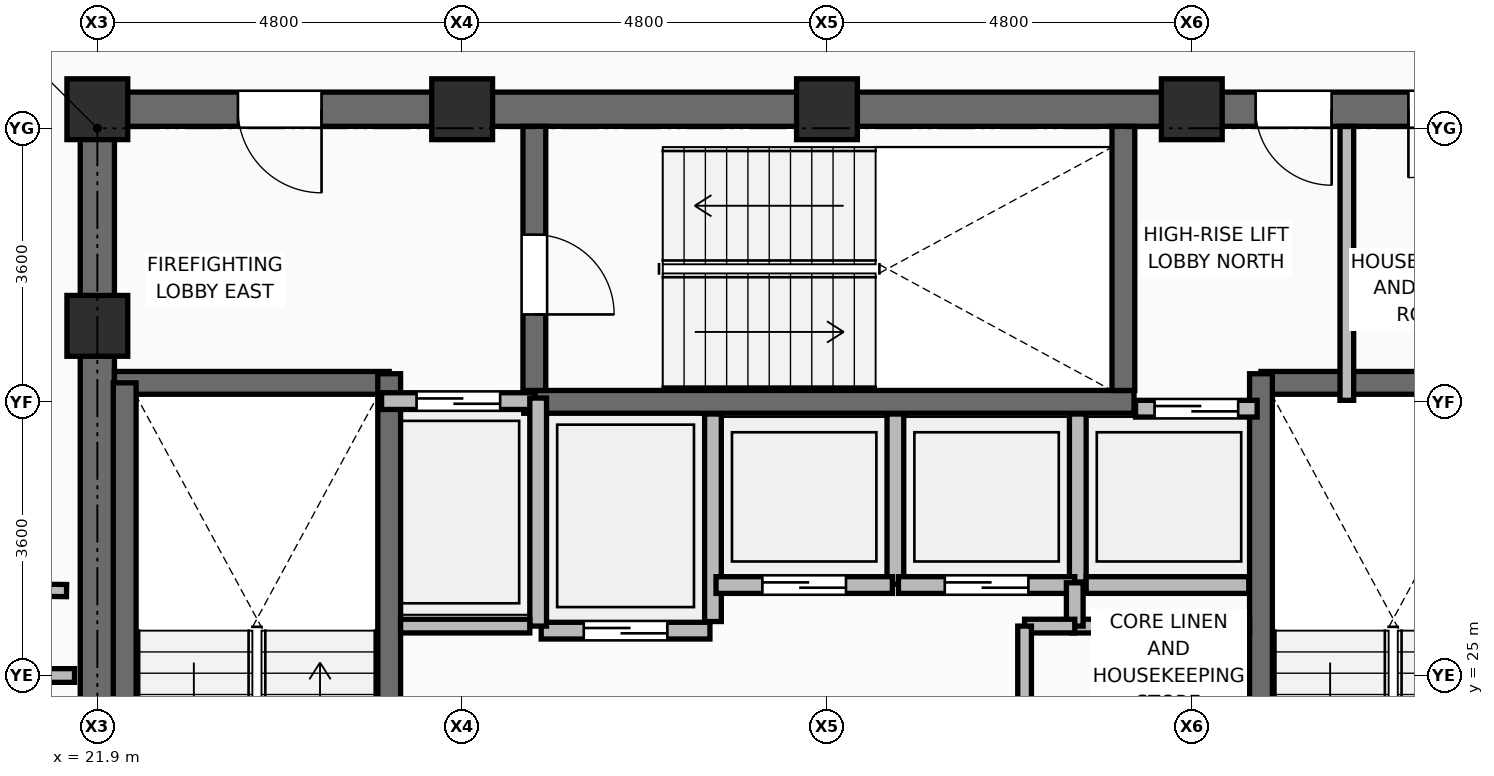
"""IFC4 building model, lengths in metres.
Left out: names, types, materials, properties, quantities, classifications, styles, units other than length and angle.
Written with IfcOpenShell. Run it as: python <this file> out.ifc"""

import sys

from ifc_helpers import new_model, si_unit, direction, frame, frame_2d, origin, origin_2d, place, context, subcontext, project, spatial, rectangle, extrude, element, fill, save


model = new_model("IFC4")
c1 = context("Model", 3, precision=1e-05, world=origin(), true_north=direction((0.0, 1.0)))
c2 = subcontext(c1, "Body", "Model", "MODEL_VIEW")
j1 = project(units=[si_unit("LENGTHUNIT", "METRE"), si_unit("PLANEANGLEUNIT", "RADIAN")], contexts=[c1])
p1 = place(None, origin())
s1 = spatial("IfcSite", under=j1, at=p1, CompositionType="ELEMENT")
p2 = place(p1, origin())
s2 = spatial("IfcBuilding", under=s1, at=p2, CompositionType="ELEMENT")
p3 = place(p2, frame((0.0, 0.0, 249.9)))
s3 = spatial("IfcBuildingStorey", under=s2, at=p3, CompositionType="ELEMENT", Elevation=249.9)
for number, where, z_axis, x_axis in (
    (1, (21.9, 29.6, 0.0), (0.0, 0.0, 1.0), (1.0, 0.0, 0.0)),
    (2, (21.9, 32.45, 0.0), (0.0, 0.0, 1.0), (1.0, 0.0, 0.0)),
    (3, (26.7, 32.45, 0.0), (0.0, 0.0, 1.0), (1.0, 0.0, 0.0)),
    (4, (31.5, 32.45, 0.0), (0.0, 0.0, 1.0), (1.0, 0.0, 0.0)),
    (5, (36.3, 32.45, 0.0), (0.0, 0.0, 1.0), (1.0, 0.0, 0.0)),
):
    element("IfcColumn", number, at=place(p3, frame(where, z_axis=z_axis, x_axis=x_axis)), inside=s3, PredefinedType="COLUMN", context=c2, shape_type="SweptSolid", body=[
        extrude(rectangle(XDim=0.8, YDim=0.8, at=origin_2d()), origin(), (0.0, 0.0, 1.0), 3.75),
    ])
p4 = place(p3, frame((30.0, 25.71, 0.0), z_axis=(0.0, 0.0, 1.0), x_axis=(0.0, 1.0, 0.0)))
e6 = element("IfcWall", 6, at=p4, inside=s3, PredefinedType="PARTITIONING", context=c2, shape_type="SweptSolid", body=[
    extrude(rectangle(XDim=2.73, YDim=0.22, at=frame_2d((1.365, 0.0))), origin(), (0.0, 0.0, 1.0), 3.475),
])
p5 = place(p3, frame((32.4, 26.2, 0.0), z_axis=(0.0, 0.0, 1.0), x_axis=(0.0, 1.0, 0.0)))
e7 = element("IfcWall", 7, at=p5, inside=s3, PredefinedType="PARTITIONING", context=c2, shape_type="SweptSolid", body=[
    extrude(rectangle(XDim=2.24, YDim=0.22, at=frame_2d((1.12, 0.0))), origin(), (0.0, 0.0, 1.0), 3.475),
])
p6 = place(p3, frame((34.8, 26.23, 0.0), z_axis=(0.0, 0.0, 1.0), x_axis=(0.0, 1.0, 0.0)))
e8 = element("IfcWall", 8, at=p6, inside=s3, PredefinedType="PARTITIONING", context=c2, shape_type="SweptSolid", body=[
    extrude(rectangle(XDim=2.21, YDim=0.22, at=frame_2d((1.105, 0.0))), origin(), (0.0, 0.0, 1.0), 3.475),
])
p7 = place(p3, frame((34.91, 26.19, 0.0), z_axis=(0.0, 0.0, 1.0), x_axis=(1.0, 0.0, 0.0)))
e9 = element("IfcWall", 9, at=p7, inside=s3, PredefinedType="PARTITIONING", context=c2, shape_type="SweptSolid", body=[
    extrude(rectangle(XDim=2.14, YDim=0.22, at=frame_2d((1.07, 0.0))), origin(), (0.0, 0.0, 1.0), 3.475),
])
p8 = place(p3, frame((21.675, 32.45, 0.0), z_axis=(0.0, 0.0, 1.0), x_axis=(1.0, 0.0, 0.0)))
e10 = element("IfcWall", 10, at=p8, inside=s3, PredefinedType="SHEAR", context=c2, shape_type="SweptSolid", body=[
    extrude(rectangle(XDim=19.65, YDim=0.45, at=frame_2d((9.825, 0.0))), origin(), (0.0, 0.0, 1.0), 3.5),
])
p9 = place(p8, frame((2.075, 0.0, 0.0)))
e11 = element("IfcOpeningElement", 11, at=p9, cuts=e10, PredefinedType="OPENING", context=c2, shape_type="SweptSolid", body=[
    extrude(rectangle(XDim=1.1, YDim=2.1, at=frame_2d((0.55, 1.05))), frame((0.0, 0.235, 0.0), z_axis=(0.0, -1.0, 0.0), x_axis=(1.0, 0.0, 0.0)), (0.0, 0.0, 1.0), 0.47),
])
p10 = place(p8, frame((15.465, 0.0, 0.0)))
e12 = element("IfcOpeningElement", 12, at=p10, cuts=e10, PredefinedType="OPENING", context=c2, shape_type="SweptSolid", body=[
    extrude(rectangle(XDim=1.0, YDim=2.1, at=frame_2d((0.5, 1.05))), frame((0.0, 0.235, 0.0), z_axis=(0.0, -1.0, 0.0), x_axis=(1.0, 0.0, 0.0)), (0.0, 0.0, 1.0), 0.47),
])
p11 = place(p8, frame((17.475, 0.0, 0.0)))
e13 = element("IfcOpeningElement", 13, at=p11, cuts=e10, PredefinedType="OPENING", context=c2, shape_type="SweptSolid", body=[
    extrude(rectangle(XDim=0.9, YDim=2.1, at=frame_2d((0.45, 1.05))), frame((0.0, 0.235, 0.0), z_axis=(0.0, -1.0, 0.0), x_axis=(1.0, 0.0, 0.0)), (0.0, 0.0, 1.0), 0.47),
])
p12 = place(p3, frame((21.9, 18.025, 0.0), z_axis=(0.0, 0.0, 1.0), x_axis=(0.0, 1.0, 0.0)))
e14 = element("IfcWall", 14, at=p12, inside=s3, PredefinedType="SHEAR", context=c2, shape_type="SweptSolid", body=[
    extrude(rectangle(XDim=14.2, YDim=0.45, at=frame_2d((7.1, 0.0))), origin(), (0.0, 0.0, 1.0), 3.5),
])
p13 = place(p3, frame((22.125, 28.85, 0.0), z_axis=(0.0, 0.0, 1.0), x_axis=(1.0, 0.0, 0.0)))
e15 = element("IfcWall", 15, at=p13, inside=s3, PredefinedType="SHEAR", context=c2, shape_type="SweptSolid", body=[
    extrude(rectangle(XDim=3.615, YDim=0.3, at=frame_2d((1.808, 0.0))), origin(), (0.0, 0.0, 1.0), 3.5),
])
p14 = place(p3, frame((25.74, 20.98, 0.0), z_axis=(0.0, 0.0, 1.0), x_axis=(0.0, 1.0, 0.0)))
e16 = element("IfcWall", 16, at=p14, inside=s3, PredefinedType="SHEAR", context=c2, shape_type="SweptSolid", body=[
    extrude(rectangle(XDim=7.99, YDim=0.3, at=frame_2d((3.995, 0.0))), origin(), (0.0, 0.0, 1.0), 3.5),
])
p15 = place(p3, frame((22.26, 21.1, 0.0), z_axis=(0.0, 0.0, 1.0), x_axis=(0.0, 1.0, 0.0)))
e17 = element("IfcWall", 17, at=p15, inside=s3, PredefinedType="SHEAR", context=c2, shape_type="SweptSolid", body=[
    extrude(rectangle(XDim=7.75, YDim=0.3, at=frame_2d((3.875, 0.0))), origin(), (0.0, 0.0, 1.0), 3.5),
])
p16 = place(p3, frame((37.21, 28.85, 0.0), z_axis=(0.0, 0.0, 1.0), x_axis=(1.0, 0.0, 0.0)))
e18 = element("IfcWall", 18, at=p16, inside=s3, PredefinedType="SHEAR", context=c2, shape_type="SweptSolid", body=[
    extrude(rectangle(XDim=3.665, YDim=0.3, at=frame_2d((1.833, 0.0))), origin(), (0.0, 0.0, 1.0), 3.5),
])
p17 = place(p3, frame((37.21, 20.98, 0.0), z_axis=(0.0, 0.0, 1.0), x_axis=(0.0, 1.0, 0.0)))
e19 = element("IfcWall", 19, at=p17, inside=s3, PredefinedType="SHEAR", context=c2, shape_type="SweptSolid", body=[
    extrude(rectangle(XDim=7.99, YDim=0.3, at=frame_2d((3.995, 0.0))), origin(), (0.0, 0.0, 1.0), 3.5),
])
p18 = place(p3, frame((27.51, 28.6, 0.0), z_axis=(0.0, 0.0, 1.0), x_axis=(1.0, 0.0, 0.0)))
e20 = element("IfcWall", 20, at=p18, inside=s3, PredefinedType="SHEAR", context=c2, shape_type="SweptSolid", body=[
    extrude(rectangle(XDim=8.03, YDim=0.3, at=frame_2d((4.015, 0.0))), origin(), (0.0, 0.0, 1.0), 3.5),
])
p19 = place(p3, frame((27.65, 28.75, 0.0), z_axis=(0.0, 0.0, 1.0), x_axis=(0.0, 1.0, 0.0)))
e21 = element("IfcWall", 21, at=p19, inside=s3, PredefinedType="SHEAR", context=c2, shape_type="SweptSolid", body=[
    extrude(rectangle(XDim=3.475, YDim=0.3, at=frame_2d((1.738, 0.0))), origin(), (0.0, 0.0, 1.0), 3.5),
])
p20 = place(p19, frame((1.0, 0.0, 0.0)))
e22 = element("IfcOpeningElement", 22, at=p20, cuts=e21, PredefinedType="OPENING", context=c2, shape_type="SweptSolid", body=[
    extrude(rectangle(XDim=1.05, YDim=2.1, at=frame_2d((0.525, 1.05))), frame((0.0, 0.16, 0.0), z_axis=(0.0, -1.0, 0.0), x_axis=(1.0, 0.0, 0.0)), (0.0, 0.0, 1.0), 0.32),
])
p21 = place(p3, frame((35.4, 28.75, 0.0), z_axis=(0.0, 0.0, 1.0), x_axis=(0.0, 1.0, 0.0)))
e23 = element("IfcWall", 23, at=p21, inside=s3, PredefinedType="SHEAR", context=c2, shape_type="SweptSolid", body=[
    extrude(rectangle(XDim=3.475, YDim=0.3, at=frame_2d((1.738, 0.0))), origin(), (0.0, 0.0, 1.0), 3.5),
])
p22 = place(p3, frame((25.64, 28.61, 0.0), z_axis=(0.0, 0.0, 1.0), x_axis=(1.0, 0.0, 0.0)))
e24 = element("IfcWall", 24, at=p22, inside=s3, PredefinedType="PARTITIONING", context=c2, shape_type="SweptSolid", body=[
    extrude(rectangle(XDim=2.02, YDim=0.22, at=frame_2d((1.01, 0.0))), origin(), (0.0, 0.0, 1.0), 3.48),
])
p23 = place(p22, frame((0.46, 0.0, 0.0)))
e25 = element("IfcOpeningElement", 25, at=p23, cuts=e24, PredefinedType="OPENING", context=c2, shape_type="SweptSolid", body=[
    extrude(rectangle(XDim=1.1, YDim=2.2, at=frame_2d((0.55, 1.1))), frame((0.0, 0.12, 0.0), z_axis=(0.0, -1.0, 0.0), x_axis=(1.0, 0.0, 0.0)), (0.0, 0.0, 1.0), 0.24),
])
p24 = place(p3, frame((27.74, 25.59, 0.0), z_axis=(0.0, 0.0, 1.0), x_axis=(1.0, 0.0, 0.0)))
e26 = element("IfcWall", 26, at=p24, inside=s3, PredefinedType="PARTITIONING", context=c2, shape_type="SweptSolid", body=[
    extrude(rectangle(XDim=2.22, YDim=0.22, at=frame_2d((1.11, 0.0))), origin(), (0.0, 0.0, 1.0), 3.48),
])
p25 = place(p24, frame((0.56, 0.0, 0.0)))
e27 = element("IfcOpeningElement", 27, at=p25, cuts=e26, PredefinedType="OPENING", context=c2, shape_type="SweptSolid", body=[
    extrude(rectangle(XDim=1.1, YDim=2.2, at=frame_2d((0.55, 1.1))), frame((0.0, 0.12, 0.0), z_axis=(0.0, -1.0, 0.0), x_axis=(1.0, 0.0, 0.0)), (0.0, 0.0, 1.0), 0.24),
])
p26 = place(p3, frame((30.04, 26.19, 0.0), z_axis=(0.0, 0.0, 1.0), x_axis=(1.0, 0.0, 0.0)))
e28 = element("IfcWall", 28, at=p26, inside=s3, PredefinedType="PARTITIONING", context=c2, shape_type="SweptSolid", body=[
    extrude(rectangle(XDim=2.32, YDim=0.22, at=frame_2d((1.16, 0.0))), origin(), (0.0, 0.0, 1.0), 3.48),
])
p27 = place(p26, frame((0.61, 0.0, 0.0)))
e29 = element("IfcOpeningElement", 29, at=p27, cuts=e28, PredefinedType="OPENING", context=c2, shape_type="SweptSolid", body=[
    extrude(rectangle(XDim=1.1, YDim=2.2, at=frame_2d((0.55, 1.1))), frame((0.0, 0.12, 0.0), z_axis=(0.0, -1.0, 0.0), x_axis=(1.0, 0.0, 0.0)), (0.0, 0.0, 1.0), 0.24),
])
p28 = place(p3, frame((32.44, 26.19, 0.0), z_axis=(0.0, 0.0, 1.0), x_axis=(1.0, 0.0, 0.0)))
e30 = element("IfcWall", 30, at=p28, inside=s3, PredefinedType="PARTITIONING", context=c2, shape_type="SweptSolid", body=[
    extrude(rectangle(XDim=2.32, YDim=0.22, at=frame_2d((1.16, 0.0))), origin(), (0.0, 0.0, 1.0), 3.48),
])
p29 = place(p28, frame((0.61, 0.0, 0.0)))
e31 = element("IfcOpeningElement", 31, at=p29, cuts=e30, PredefinedType="OPENING", context=c2, shape_type="SweptSolid", body=[
    extrude(rectangle(XDim=1.1, YDim=2.2, at=frame_2d((0.55, 1.1))), frame((0.0, 0.12, 0.0), z_axis=(0.0, -1.0, 0.0), x_axis=(1.0, 0.0, 0.0)), (0.0, 0.0, 1.0), 0.24),
])
p30 = place(p3, frame((35.56, 28.51, 0.0), z_axis=(0.0, 0.0, 1.0), x_axis=(1.0, 0.0, 0.0)))
e32 = element("IfcWall", 32, at=p30, inside=s3, PredefinedType="PARTITIONING", context=c2, shape_type="SweptSolid", body=[
    extrude(rectangle(XDim=1.6, YDim=0.22, at=frame_2d((0.8, 0.0))), origin(), (0.0, 0.0, 1.0), 3.48),
])
p31 = place(p30, frame((0.25, 0.0, 0.0)))
e33 = element("IfcOpeningElement", 33, at=p31, cuts=e32, PredefinedType="OPENING", context=c2, shape_type="SweptSolid", body=[
    extrude(rectangle(XDim=1.1, YDim=2.2, at=frame_2d((0.55, 1.1))), frame((0.0, 0.12, 0.0), z_axis=(0.0, -1.0, 0.0), x_axis=(1.0, 0.0, 0.0)), (0.0, 0.0, 1.0), 0.24),
])
p32 = place(p3, frame((27.7, 25.65, 0.0), z_axis=(0.0, 0.0, 1.0), x_axis=(0.0, 1.0, 0.0)))
e34 = element("IfcWall", 34, at=p32, inside=s3, PredefinedType="PARTITIONING", context=c2, shape_type="SweptSolid", body=[
    extrude(rectangle(XDim=3.0, YDim=0.22, at=frame_2d((1.5, 0.0))), origin(), (0.0, 0.0, 1.0), 3.48),
])
p33 = place(p3, frame((25.89, 25.65, 0.0), z_axis=(0.0, 0.0, 1.0), x_axis=(1.0, 0.0, 0.0)))
e35 = element("IfcWall", 35, at=p33, inside=s3, PredefinedType="PARTITIONING", context=c2, shape_type="SweptSolid", body=[
    extrude(rectangle(XDim=1.7, YDim=0.18, at=frame_2d((0.85, 0.0))), origin(), (0.0, 0.0, 1.0), 3.48),
])
p34 = place(p3, frame((34.72, 25.65, 0.0), z_axis=(0.0, 0.0, 1.0), x_axis=(1.0, 0.0, 0.0)))
e36 = element("IfcWall", 36, at=p34, inside=s3, PredefinedType="PARTITIONING", context=c2, shape_type="SweptSolid", body=[
    extrude(rectangle(XDim=2.34, YDim=0.18, at=frame_2d((1.17, 0.0))), origin(), (0.0, 0.0, 1.0), 3.48),
])
p35 = place(p3, frame((34.76, 25.65, 0.0), z_axis=(0.0, 0.0, 1.0), x_axis=(0.0, 1.0, 0.0)))
e37 = element("IfcWall", 37, at=p35, inside=s3, PredefinedType="PARTITIONING", context=c2, shape_type="SweptSolid", body=[
    extrude(rectangle(XDim=0.57, YDim=0.22, at=frame_2d((0.285, 0.0))), origin(), (0.0, 0.0, 1.0), 3.48),
])
p36 = place(p3, frame((34.1, 25.65, 0.0), z_axis=(0.0, 0.0, 1.0), x_axis=(1.0, 0.0, 0.0)))
e38 = element("IfcWall", 38, at=p36, inside=s3, PredefinedType="PARTITIONING", context=c2, shape_type="SweptSolid", body=[
    extrude(rectangle(XDim=0.66, YDim=0.18, at=frame_2d((0.33, 0.0))), origin(), (0.0, 0.0, 1.0), 3.48),
])
p37 = place(p3, frame((34.1, 21.1, 0.0), z_axis=(0.0, 0.0, 1.0), x_axis=(0.0, 1.0, 0.0)))
e39 = element("IfcWall", 39, at=p37, inside=s3, PredefinedType="PARTITIONING", context=c2, shape_type="SweptSolid", body=[
    extrude(rectangle(XDim=4.55, YDim=0.18, at=frame_2d((2.275, 0.0))), origin(), (0.0, 0.0, 1.0), 3.48),
])
p38 = place(p37, frame((1.825, 0.0, 0.0)))
e40 = element("IfcOpeningElement", 40, at=p38, cuts=e39, PredefinedType="OPENING", context=c2, shape_type="SweptSolid", body=[
    extrude(rectangle(XDim=0.9, YDim=2.1, at=frame_2d((0.45, 1.05))), frame((0.0, 0.1, 0.0), z_axis=(0.0, -1.0, 0.0), x_axis=(1.0, 0.0, 0.0)), (0.0, 0.0, 1.0), 0.2),
])
p39 = place(p3, frame((38.34, 28.62, 0.0), z_axis=(0.0, 0.0, 1.0), x_axis=(0.0, 1.0, 0.0)))
e41 = element("IfcWall", 41, at=p39, inside=s3, PredefinedType="PARTITIONING", context=c2, shape_type="SweptSolid", body=[
    extrude(rectangle(XDim=3.605, YDim=0.18, at=frame_2d((1.802, 0.0))), origin(), (0.0, 0.0, 1.0), 3.48),
])
p40 = place(p3, frame((21.495, 26.117, 0.0), z_axis=(0.0, 0.0, 1.0), x_axis=(-0.999908537082, 0.013524698532, 0.0)))
e42 = element("IfcWall", 42, at=p40, inside=s3, PredefinedType="PARTITIONING", context=c2, shape_type="SweptSolid", body=[
    extrude(rectangle(XDim=1.859, YDim=0.16, at=frame_2d((0.93, 0.0))), origin(), (0.0, 0.0, 1.0), 2.525),
])
p41 = place(p3, frame((21.6, 25.0, 0.0), z_axis=(0.0, 0.0, 1.0), x_axis=(-1.0, 0.0, 0.0)))
e43 = element("IfcWall", 43, at=p41, inside=s3, PredefinedType="PARTITIONING", context=c2, shape_type="SweptSolid", body=[
    extrude(rectangle(XDim=12.267, YDim=0.18, at=frame_2d((6.134, 0.0))), origin(), (0.0, 0.0, 1.0), 2.525),
])
p42 = place(p20, frame((1.05, 0.0, 0.0), z_axis=(0.0, 0.0, 1.0), x_axis=(-1.0, 0.0, 0.0)))
e44 = element("IfcDoor", 44, at=p42, inside=s3, OperationType="SINGLE_SWING_RIGHT", PredefinedType="DOOR", context=c2, shape_type="SweptSolid", body=[
    extrude(rectangle(XDim=1.05, YDim=2.1, at=frame_2d((0.525, 1.05))), frame((0.0, 0.025, 0.0), z_axis=(0.0, -1.0, 0.0), x_axis=(1.0, 0.0, 0.0)), (0.0, 0.0, 1.0), 0.05),
])
fill(e22, e44)
p43 = place(p23, origin())
e45 = element("IfcDoor", 45, at=p43, inside=s3, OperationType="DOUBLE_DOOR_SLIDING", PredefinedType="DOOR", context=c2, shape_type="SweptSolid", body=[
    extrude(rectangle(XDim=1.1, YDim=2.2, at=frame_2d((0.55, 1.1))), frame((0.0, 0.025, 0.0), z_axis=(0.0, -1.0, 0.0), x_axis=(1.0, 0.0, 0.0)), (0.0, 0.0, 1.0), 0.05),
])
fill(e25, e45)
p44 = place(p25, frame((1.1, 0.0, 0.0), z_axis=(0.0, 0.0, 1.0), x_axis=(-1.0, 0.0, 0.0)))
e46 = element("IfcDoor", 46, at=p44, inside=s3, OperationType="DOUBLE_DOOR_SLIDING", PredefinedType="DOOR", context=c2, shape_type="SweptSolid", body=[
    extrude(rectangle(XDim=1.1, YDim=2.2, at=frame_2d((0.55, 1.1))), frame((0.0, 0.025, 0.0), z_axis=(0.0, -1.0, 0.0), x_axis=(1.0, 0.0, 0.0)), (0.0, 0.0, 1.0), 0.05),
])
fill(e27, e46)
p45 = place(p27, frame((1.1, 0.0, 0.0), z_axis=(0.0, 0.0, 1.0), x_axis=(-1.0, 0.0, 0.0)))
e47 = element("IfcDoor", 47, at=p45, inside=s3, OperationType="DOUBLE_DOOR_SLIDING", PredefinedType="DOOR", context=c2, shape_type="SweptSolid", body=[
    extrude(rectangle(XDim=1.1, YDim=2.2, at=frame_2d((0.55, 1.1))), frame((0.0, 0.025, 0.0), z_axis=(0.0, -1.0, 0.0), x_axis=(1.0, 0.0, 0.0)), (0.0, 0.0, 1.0), 0.05),
])
fill(e29, e47)
p46 = place(p29, frame((1.1, 0.0, 0.0), z_axis=(0.0, 0.0, 1.0), x_axis=(-1.0, 0.0, 0.0)))
e48 = element("IfcDoor", 48, at=p46, inside=s3, OperationType="DOUBLE_DOOR_SLIDING", PredefinedType="DOOR", context=c2, shape_type="SweptSolid", body=[
    extrude(rectangle(XDim=1.1, YDim=2.2, at=frame_2d((0.55, 1.1))), frame((0.0, 0.025, 0.0), z_axis=(0.0, -1.0, 0.0), x_axis=(1.0, 0.0, 0.0)), (0.0, 0.0, 1.0), 0.05),
])
fill(e31, e48)
p47 = place(p31, origin())
e49 = element("IfcDoor", 49, at=p47, inside=s3, OperationType="DOUBLE_DOOR_SLIDING", PredefinedType="DOOR", context=c2, shape_type="SweptSolid", body=[
    extrude(rectangle(XDim=1.1, YDim=2.2, at=frame_2d((0.55, 1.1))), frame((0.0, 0.025, 0.0), z_axis=(0.0, -1.0, 0.0), x_axis=(1.0, 0.0, 0.0)), (0.0, 0.0, 1.0), 0.05),
])
fill(e33, e49)
p48 = place(p9, frame((1.1, 0.0, 0.0), z_axis=(0.0, 0.0, 1.0), x_axis=(-1.0, 0.0, 0.0)))
e50 = element("IfcDoor", 50, at=p48, inside=s3, OperationType="SINGLE_SWING_LEFT", PredefinedType="DOOR", context=c2, shape_type="SweptSolid", body=[
    extrude(rectangle(XDim=1.1, YDim=2.1, at=frame_2d((0.55, 1.05))), frame((0.0, 0.025, 0.0), z_axis=(0.0, -1.0, 0.0), x_axis=(1.0, 0.0, 0.0)), (0.0, 0.0, 1.0), 0.05),
])
fill(e11, e50)
p49 = place(p10, frame((1.0, 0.0, 0.0), z_axis=(0.0, 0.0, 1.0), x_axis=(-1.0, 0.0, 0.0)))
e51 = element("IfcDoor", 51, at=p49, inside=s3, OperationType="SINGLE_SWING_LEFT", PredefinedType="DOOR", context=c2, shape_type="SweptSolid", body=[
    extrude(rectangle(XDim=1.0, YDim=2.1, at=frame_2d((0.5, 1.05))), frame((0.0, 0.025, 0.0), z_axis=(0.0, -1.0, 0.0), x_axis=(1.0, 0.0, 0.0)), (0.0, 0.0, 1.0), 0.05),
])
fill(e12, e51)
p50 = place(p11, frame((0.9, 0.0, 0.0), z_axis=(0.0, 0.0, 1.0), x_axis=(-1.0, 0.0, 0.0)))
e52 = element("IfcDoor", 52, at=p50, inside=s3, OperationType="SINGLE_SWING_RIGHT", PredefinedType="DOOR", context=c2, shape_type="SweptSolid", body=[
    extrude(rectangle(XDim=0.9, YDim=2.1, at=frame_2d((0.45, 1.05))), frame((0.0, 0.025, 0.0), z_axis=(0.0, -1.0, 0.0), x_axis=(1.0, 0.0, 0.0)), (0.0, 0.0, 1.0), 0.05),
])
fill(e13, e52)
save(model, sys.argv[1])
